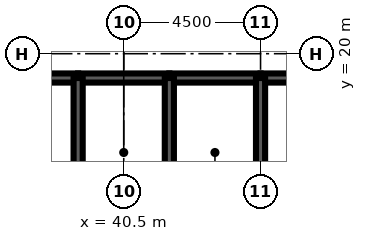
"""IFC4 building model, lengths in metres.
Left out: names, types, materials, properties, quantities, classifications, styles, units other than length and angle.
Written with IfcOpenShell. Run it as: python <this file> out.ifc"""

import sys

from ifc_helpers import new_model, si_unit, direction, frame, frame_2d, origin, place, context, subcontext, project, spatial, rectangle, extrude, element, fill, save


model = new_model("IFC4")
c1 = context("Model", 3, precision=1e-05, world=origin(), true_north=direction((0.0, 1.0)))
c2 = subcontext(c1, "Body", "Model", "MODEL_VIEW")
j1 = project(units=[si_unit("LENGTHUNIT", "METRE"), si_unit("PLANEANGLEUNIT", "RADIAN")], contexts=[c1])
p1 = place(None, origin())
s1 = spatial("IfcSite", under=j1, at=p1, CompositionType="ELEMENT")
p2 = place(p1, origin())
s2 = spatial("IfcBuilding", under=s1, at=p2, CompositionType="ELEMENT")
p3 = place(p2, frame((0.0, 0.0, 275.3)))
s3 = spatial("IfcBuildingStorey", under=s2, at=p3, CompositionType="ELEMENT", Elevation=275.3)
p4 = place(p3, frame((36.0, 19.2, 0.0), z_axis=(0.0, 0.0, 1.0), x_axis=(1.0, 0.0, 0.0)))
e1 = element("IfcWall", 1, at=p4, inside=s3, PredefinedType="SOLIDWALL", context=c2, shape_type="SweptSolid", body=[
    extrude(rectangle(XDim=3.0, YDim=0.3, at=frame_2d((1.5, 0.0))), origin(), (0.0, 0.0, 1.0), 4.2),
])
p5 = place(p4, frame((0.95, 0.0, 0.0)))
e2 = element("IfcOpeningElement", 2, at=p5, cuts=e1, PredefinedType="OPENING", context=c2, shape_type="SweptSolid", body=[
    extrude(rectangle(XDim=1.1, YDim=2.2, at=frame_2d((0.55, 1.1))), frame((0.0, 0.16, 0.0), z_axis=(0.0, -1.0, 0.0), x_axis=(1.0, 0.0, 0.0)), (0.0, 0.0, 1.0), 0.32),
])
p6 = place(p3, frame((39.0, 19.2, 0.0), z_axis=(0.0, 0.0, 1.0), x_axis=(1.0, 0.0, 0.0)))
e3 = element("IfcWall", 3, at=p6, inside=s3, PredefinedType="SOLIDWALL", context=c2, shape_type="SweptSolid", body=[
    extrude(rectangle(XDim=3.0, YDim=0.3, at=frame_2d((1.5, 0.0))), origin(), (0.0, 0.0, 1.0), 4.2),
])
p7 = place(p6, frame((1.0, 0.0, 0.0)))
e4 = element("IfcOpeningElement", 4, at=p7, cuts=e3, PredefinedType="OPENING", context=c2, shape_type="SweptSolid", body=[
    extrude(rectangle(XDim=1.0, YDim=2.1, at=frame_2d((0.5, 1.05))), frame((0.0, 0.16, 0.0), z_axis=(0.0, -1.0, 0.0), x_axis=(1.0, 0.0, 0.0)), (0.0, 0.0, 1.0), 0.32),
])
p8 = place(p3, frame((42.0, 19.2, 0.0), z_axis=(0.0, 0.0, 1.0), x_axis=(1.0, 0.0, 0.0)))
e5 = element("IfcWall", 5, at=p8, inside=s3, PredefinedType="SOLIDWALL", context=c2, shape_type="SweptSolid", body=[
    extrude(rectangle(XDim=3.0, YDim=0.3, at=frame_2d((1.5, 0.0))), origin(), (0.0, 0.0, 1.0), 4.2),
])
p9 = place(p8, frame((1.0, 0.0, 0.0)))
e6 = element("IfcOpeningElement", 6, at=p9, cuts=e5, PredefinedType="OPENING", context=c2, shape_type="SweptSolid", body=[
    extrude(rectangle(XDim=1.0, YDim=2.1, at=frame_2d((0.5, 1.05))), frame((0.0, 0.16, 0.0), z_axis=(0.0, -1.0, 0.0), x_axis=(1.0, 0.0, 0.0)), (0.0, 0.0, 1.0), 0.32),
])
p10 = place(p3, frame((45.0, 19.2, 0.0), z_axis=(0.0, 0.0, 1.0), x_axis=(1.0, 0.0, 0.0)))
e7 = element("IfcWall", 7, at=p10, inside=s3, PredefinedType="SOLIDWALL", context=c2, shape_type="SweptSolid", body=[
    extrude(rectangle(XDim=9.0, YDim=0.3, at=frame_2d((4.5, 0.0))), origin(), (0.0, 0.0, 1.0), 4.2),
])
p11 = place(p10, frame((7.35, 0.0, 0.0)))
e8 = element("IfcOpeningElement", 8, at=p11, cuts=e7, PredefinedType="OPENING", context=c2, shape_type="SweptSolid", body=[
    extrude(rectangle(XDim=1.0, YDim=2.1, at=frame_2d((0.5, 1.05))), frame((0.0, 0.16, 0.0), z_axis=(0.0, -1.0, 0.0), x_axis=(1.0, 0.0, 0.0)), (0.0, 0.0, 1.0), 0.32),
])
for number, where, z_axis, x_axis in (
    (9, (39.0, 16.0, 0.0), (0.0, 0.0, 1.0), (0.0, 1.0, 0.0)),
    (10, (42.0, 16.0, 0.0), (0.0, 0.0, 1.0), (0.0, 1.0, 0.0)),
    (11, (45.0, 16.0, 0.0), (0.0, 0.0, 1.0), (0.0, 1.0, 0.0)),
):
    element("IfcWall", number, at=place(p3, frame(where, z_axis=z_axis, x_axis=x_axis)), inside=s3, PredefinedType="SOLIDWALL", context=c2, shape_type="SweptSolid", body=[
        extrude(rectangle(XDim=3.2, YDim=0.3, at=frame_2d((1.6, 0.0))), origin(), (0.0, 0.0, 1.0), 4.2),
    ])
p12 = place(p3, frame((39.15, 17.3, 0.0), z_axis=(0.0, 0.0, 1.0), x_axis=(1.0, 0.0, 0.0)))
e12 = element("IfcWall", 12, at=p12, inside=s3, PredefinedType="SOLIDWALL", context=c2, shape_type="SweptSolid", body=[
    extrude(rectangle(XDim=2.7, YDim=0.3, at=frame_2d((1.35, 0.0))), origin(), (0.0, 0.0, 1.0), 4.04),
])
p13 = place(p12, frame((0.85, 0.0, 0.0)))
e13 = element("IfcOpeningElement", 13, at=p13, cuts=e12, PredefinedType="OPENING", context=c2, shape_type="SweptSolid", body=[
    extrude(rectangle(XDim=1.0, YDim=2.1, at=frame_2d((0.5, 1.05))), frame((0.0, 0.16, 0.0), z_axis=(0.0, -1.0, 0.0), x_axis=(1.0, 0.0, 0.0)), (0.0, 0.0, 1.0), 0.32),
])
p14 = place(p3, frame((42.15, 17.3, 0.0), z_axis=(0.0, 0.0, 1.0), x_axis=(1.0, 0.0, 0.0)))
e14 = element("IfcWall", 14, at=p14, inside=s3, PredefinedType="SOLIDWALL", context=c2, shape_type="SweptSolid", body=[
    extrude(rectangle(XDim=2.7, YDim=0.3, at=frame_2d((1.35, 0.0))), origin(), (0.0, 0.0, 1.0), 4.04),
])
p15 = place(p14, frame((0.85, 0.0, 0.0)))
e15 = element("IfcOpeningElement", 15, at=p15, cuts=e14, PredefinedType="OPENING", context=c2, shape_type="SweptSolid", body=[
    extrude(rectangle(XDim=1.0, YDim=2.1, at=frame_2d((0.5, 1.05))), frame((0.0, 0.16, 0.0), z_axis=(0.0, -1.0, 0.0), x_axis=(1.0, 0.0, 0.0)), (0.0, 0.0, 1.0), 0.32),
])
p16 = place(p13, origin())
e16 = element("IfcDoor", 16, at=p16, inside=s3, OperationType="SINGLE_SWING_LEFT", PredefinedType="DOOR", context=c2, shape_type="SweptSolid", body=[
    extrude(rectangle(XDim=1.0, YDim=2.1, at=frame_2d((0.5, 1.05))), frame((0.0, 0.025, 0.0), z_axis=(0.0, -1.0, 0.0), x_axis=(1.0, 0.0, 0.0)), (0.0, 0.0, 1.0), 0.05),
])
fill(e13, e16)
p17 = place(p15, origin())
e17 = element("IfcDoor", 17, at=p17, inside=s3, OperationType="SINGLE_SWING_LEFT", PredefinedType="DOOR", context=c2, shape_type="SweptSolid", body=[
    extrude(rectangle(XDim=1.0, YDim=2.1, at=frame_2d((0.5, 1.05))), frame((0.0, 0.025, 0.0), z_axis=(0.0, -1.0, 0.0), x_axis=(1.0, 0.0, 0.0)), (0.0, 0.0, 1.0), 0.05),
])
fill(e15, e17)
p18 = place(p7, origin())
e18 = element("IfcDoor", 18, at=p18, inside=s3, OperationType="SINGLE_SWING_LEFT", PredefinedType="DOOR", context=c2, shape_type="SweptSolid", body=[
    extrude(rectangle(XDim=1.0, YDim=2.1, at=frame_2d((0.5, 1.05))), frame((0.0, 0.025, 0.0), z_axis=(0.0, -1.0, 0.0), x_axis=(1.0, 0.0, 0.0)), (0.0, 0.0, 1.0), 0.05),
])
fill(e4, e18)
p19 = place(p9, origin())
e19 = element("IfcDoor", 19, at=p19, inside=s3, OperationType="SINGLE_SWING_LEFT", PredefinedType="DOOR", context=c2, shape_type="SweptSolid", body=[
    extrude(rectangle(XDim=1.0, YDim=2.1, at=frame_2d((0.5, 1.05))), frame((0.0, 0.025, 0.0), z_axis=(0.0, -1.0, 0.0), x_axis=(1.0, 0.0, 0.0)), (0.0, 0.0, 1.0), 0.05),
])
fill(e6, e19)
save(model, sys.argv[1])
